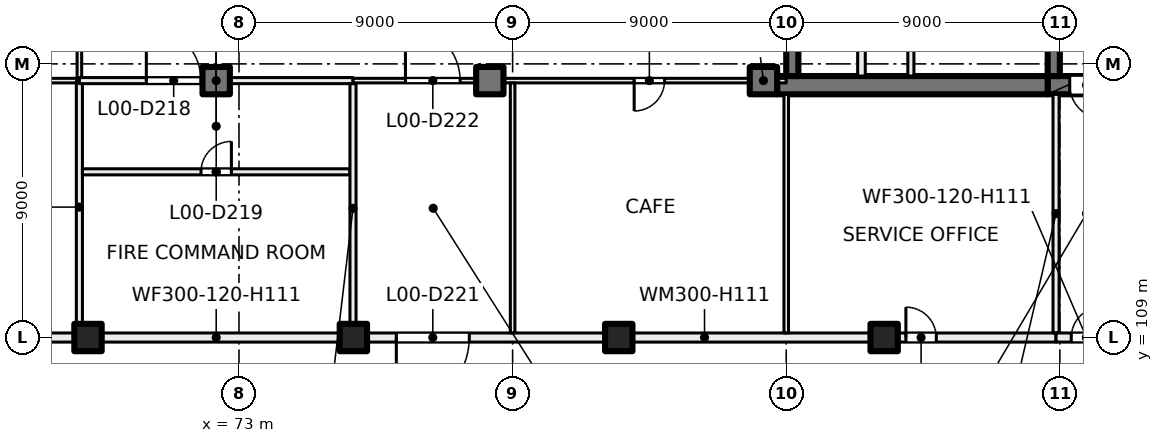
"""IFC4 building model, lengths in metres.
Left out: names, types, materials, properties, quantities, classifications, styles, units other than length and angle.
Written with IfcOpenShell. Run it as: python <this file> out.ifc"""

import sys

from ifc_helpers import new_model, si_unit, direction, frame, frame_2d, origin, origin_2d, place, context, subcontext, project, spatial, rectangle, extrude, element, fill, save


model = new_model("IFC4")
c1 = context("Model", 3, precision=1e-05, world=origin(), true_north=direction((0.0, 1.0)))
c2 = subcontext(c1, "Body", "Model", "MODEL_VIEW")
j1 = project(units=[si_unit("LENGTHUNIT", "METRE"), si_unit("PLANEANGLEUNIT", "RADIAN")], contexts=[c1])
p1 = place(None, origin())
s1 = spatial("IfcSite", under=j1, at=p1, CompositionType="ELEMENT")
p2 = place(p1, origin())
s2 = spatial("IfcBuilding", under=s1, at=p2, CompositionType="ELEMENT")
p3 = place(p2, origin())
s3 = spatial("IfcBuildingStorey", under=s2, at=p3, CompositionType="ELEMENT", Elevation=0.0)
for number, where, z_axis, x_axis in (
    (1, (68.033, 109.0, 0.0), (0.0, 0.0, 1.0), (1.0, 0.0, 0.0)),
    (2, (76.762, 109.0, 0.0), (0.0, 0.0, 1.0), (1.0, 0.0, 0.0)),
    (3, (85.491, 109.0, 0.0), (0.0, 0.0, 1.0), (1.0, 0.0, 0.0)),
    (4, (94.221, 109.0, 0.0), (0.0, 0.0, 1.0), (1.0, 0.0, 0.0)),
    (5, (72.25, 117.45, 0.0), (0.0, 0.0, 1.0), (1.0, 0.0, 0.0)),
    (6, (81.25, 117.45, 0.0), (0.0, 0.0, 1.0), (1.0, 0.0, 0.0)),
    (7, (90.25, 117.45, 0.0), (0.0, 0.0, 1.0), (1.0, 0.0, 0.0)),
):
    element("IfcColumn", number, at=place(p3, frame(where, z_axis=z_axis, x_axis=x_axis)), inside=s3, PredefinedType="COLUMN", context=c2, shape_type="SweptSolid", body=[
        extrude(rectangle(XDim=0.9, YDim=0.9, at=origin_2d()), origin(), (0.0, 0.0, 1.0), 7.5),
    ])
p4 = place(p3, frame((107.4, 117.3, 0.0), z_axis=(0.0, 0.0, 1.0), x_axis=(-1.0, 0.0, 0.0)))
e8 = element("IfcWall", 8, at=p4, inside=s3, PredefinedType="SHEAR", context=c2, shape_type="SweptSolid", body=[
    extrude(rectangle(XDim=7.8, YDim=0.6, at=frame_2d((3.9, 0.0))), origin(), (0.0, 0.0, 1.0), 7.5),
])
p5 = place(p4, frame((5.975, 0.0, 0.0)))
e9 = element("IfcOpeningElement", 9, at=p5, cuts=e8, PredefinedType="OPENING", context=c2, shape_type="SweptSolid", body=[
    extrude(rectangle(XDim=1.1, YDim=2.1, at=frame_2d((0.55, 1.05))), frame((0.0, 0.31, 0.0), z_axis=(0.0, -1.0, 0.0), x_axis=(1.0, 0.0, 0.0)), (0.0, 0.0, 1.0), 0.62),
])
p6 = place(p3, frame((99.6, 117.3, 0.0), z_axis=(0.0, 0.0, 1.0), x_axis=(-1.0, 0.0, 0.0)))
e10 = element("IfcWall", 10, at=p6, inside=s3, PredefinedType="SHEAR", context=c2, shape_type="SweptSolid", body=[
    extrude(rectangle(XDim=8.9, YDim=0.6, at=frame_2d((4.45, 0.0))), origin(), (0.0, 0.0, 1.0), 7.5),
])
p7 = place(p3, frame((99.8, 120.4, 0.0), z_axis=(0.0, 0.0, 1.0), x_axis=(0.0, -1.0, 0.0)))
e11 = element("IfcWall", 11, at=p7, inside=s3, PredefinedType="SHEAR", context=c2, shape_type="SweptSolid", body=[
    extrude(rectangle(XDim=2.8, YDim=0.4, at=frame_2d((1.4, 0.0))), origin(), (0.0, 0.0, 1.0), 7.5),
])
p8 = place(p7, frame((0.9, 0.0, 0.0)))
e12 = element("IfcOpeningElement", 12, at=p8, cuts=e11, PredefinedType="OPENING", context=c2, shape_type="SweptSolid", body=[
    extrude(rectangle(XDim=1.0, YDim=2.1, at=frame_2d((0.5, 1.05))), frame((0.0, 0.21, 0.0), z_axis=(0.0, -1.0, 0.0), x_axis=(1.0, 0.0, 0.0)), (0.0, 0.0, 1.0), 0.42),
])
p9 = place(p3, frame((91.2, 126.2, 0.0), z_axis=(0.0, 0.0, 1.0), x_axis=(0.0, -1.0, 0.0)))
e13 = element("IfcWall", 13, at=p9, inside=s3, PredefinedType="SHEAR", context=c2, shape_type="SweptSolid", body=[
    extrude(rectangle(XDim=8.6, YDim=0.4, at=frame_2d((4.3, 0.0))), origin(), (0.0, 0.0, 1.0), 7.5),
])
p10 = place(p3, frame((95.1, 117.6, 0.0), z_axis=(0.0, 0.0, 1.0), x_axis=(0.0, 1.0, 0.0)))
e14 = element("IfcWall", 14, at=p10, inside=s3, PredefinedType="PARTITIONING", context=c2, shape_type="SweptSolid", body=[
    extrude(rectangle(XDim=8.4, YDim=0.2, at=frame_2d((4.2, 0.0))), origin(), (0.0, 0.0, 1.0), 7.1),
])
p11 = place(p10, frame((1.65, 0.0, 0.0)))
e15 = element("IfcOpeningElement", 15, at=p11, cuts=e14, PredefinedType="OPENING", context=c2, shape_type="SweptSolid", body=[
    extrude(rectangle(XDim=1.5, YDim=2.1, at=frame_2d((0.75, 1.05))), frame((0.0, 0.11, 0.0), z_axis=(0.0, -1.0, 0.0), x_axis=(1.0, 0.0, 0.0)), (0.0, 0.0, 1.0), 0.22),
])
p12 = place(p3, frame((93.475, 117.6, 0.0), z_axis=(0.0, 0.0, 1.0), x_axis=(0.0, 1.0, 0.0)))
e16 = element("IfcWall", 16, at=p12, inside=s3, PredefinedType="PARTITIONING", context=c2, shape_type="SweptSolid", body=[
    extrude(rectangle(XDim=8.4, YDim=0.25, at=frame_2d((4.2, 0.0))), origin(), (0.0, 0.0, 1.0), 7.1),
])
p13 = place(p12, frame((3.8, 0.0, 0.0)))
e17 = element("IfcOpeningElement", 17, at=p13, cuts=e16, PredefinedType="OPENING", context=c2, shape_type="SweptSolid", body=[
    extrude(rectangle(XDim=0.8, YDim=2.1, at=frame_2d((0.4, 1.05))), frame((0.0, 0.135, 0.0), z_axis=(0.0, -1.0, 0.0), x_axis=(1.0, 0.0, 0.0)), (0.0, 0.0, 1.0), 0.27),
])
p14 = place(p3, frame((49.825, 117.45, 0.0), z_axis=(0.0, 0.0, 1.0), x_axis=(1.0, 0.0, 0.0)))
e18 = element("IfcWall", 18, at=p14, inside=s3, PredefinedType="PARTITIONING", context=c2, shape_type="SweptSolid", body=[
    extrude(rectangle(XDim=17.925, YDim=0.15, at=frame_2d((8.962, 0.0))), origin(), (0.0, 0.0, 1.0), 7.1),
])
p15 = place(p3, frame((59.464, 109.0, 0.0), z_axis=(0.0, 0.0, 1.0), x_axis=(1.0, 0.0, 0.0)))
e19 = element("IfcWall", 19, at=p15, inside=s3, PredefinedType="PARTITIONING", context=c2, shape_type="SweptSolid", body=[
    extrude(rectangle(XDim=8.286, YDim=0.3, at=frame_2d((4.143, 0.0))), origin(), (0.0, 0.0, 1.0), 11.1),
])
p16 = place(p3, frame((67.75, 109.15, 0.0), z_axis=(0.0, 0.0, 1.0), x_axis=(0.0, 1.0, 0.0)))
e20 = element("IfcWall", 20, at=p16, inside=s3, PredefinedType="PARTITIONING", context=c2, shape_type="SweptSolid", body=[
    extrude(rectangle(XDim=8.28, YDim=0.2, at=frame_2d((4.14, 0.0))), origin(), (0.0, 0.0, 1.0), 7.1),
])
p17 = place(p3, frame((67.75, 109.0, 0.0), z_axis=(0.0, 0.0, 1.0), x_axis=(1.0, 0.0, 0.0)))
e21 = element("IfcWall", 21, at=p17, inside=s3, PredefinedType="PARTITIONING", context=c2, shape_type="SweptSolid", body=[
    extrude(rectangle(XDim=9.0, YDim=0.3, at=frame_2d((4.5, 0.0))), origin(), (0.0, 0.0, 1.0), 11.1),
])
p18 = place(p3, frame((76.65, 114.45, 0.0), z_axis=(0.0, 0.0, 1.0), x_axis=(-1.0, 0.0, 0.0)))
e22 = element("IfcWall", 22, at=p18, inside=s3, PredefinedType="PARTITIONING", context=c2, shape_type="SweptSolid", body=[
    extrude(rectangle(XDim=8.8, YDim=0.2, at=frame_2d((4.4, 0.0))), origin(), (0.0, 0.0, 1.0), 7.1),
])
p19 = place(p18, frame((3.9, 0.0, 0.0)))
e23 = element("IfcOpeningElement", 23, at=p19, cuts=e22, PredefinedType="OPENING", context=c2, shape_type="SweptSolid", body=[
    extrude(rectangle(XDim=1.0, YDim=2.1, at=frame_2d((0.5, 1.05))), frame((0.0, 0.11, 0.0), z_axis=(0.0, -1.0, 0.0), x_axis=(1.0, 0.0, 0.0)), (0.0, 0.0, 1.0), 0.22),
])
p20 = place(p3, frame((67.75, 117.45, 0.0), z_axis=(0.0, 0.0, 1.0), x_axis=(0.0, 1.0, 0.0)))
e24 = element("IfcWall", 24, at=p20, inside=s3, PredefinedType="PARTITIONING", context=c2, shape_type="SweptSolid", body=[
    extrude(rectangle(XDim=8.55, YDim=0.15, at=frame_2d((4.275, 0.0))), origin(), (0.0, 0.0, 1.0), 7.1),
])
p21 = place(p3, frame((67.75, 117.45, 0.0), z_axis=(0.0, 0.0, 1.0), x_axis=(1.0, 0.0, 0.0)))
e25 = element("IfcWall", 25, at=p21, inside=s3, PredefinedType="PARTITIONING", context=c2, shape_type="SweptSolid", body=[
    extrude(rectangle(XDim=9.0, YDim=0.2, at=frame_2d((4.5, 0.0))), origin(), (0.0, 0.0, 1.0), 7.1),
])
p22 = place(p21, frame((2.202, 0.0, 0.0)))
e26 = element("IfcOpeningElement", 26, at=p22, cuts=e25, PredefinedType="OPENING", context=c2, shape_type="SweptSolid", body=[
    extrude(rectangle(XDim=1.8, YDim=2.1, at=frame_2d((0.9, 1.05))), frame((0.0, 0.11, 0.0), z_axis=(0.0, -1.0, 0.0), x_axis=(1.0, 0.0, 0.0)), (0.0, 0.0, 1.0), 0.22),
])
p23 = place(p3, frame((76.75, 109.15, 0.0), z_axis=(0.0, 0.0, 1.0), x_axis=(0.0, 1.0, 0.0)))
e27 = element("IfcWall", 27, at=p23, inside=s3, PredefinedType="PARTITIONING", context=c2, shape_type="SweptSolid", body=[
    extrude(rectangle(XDim=8.2, YDim=0.2, at=frame_2d((4.1, 0.0))), origin(), (0.0, 0.0, 1.0), 7.1),
])
p24 = place(p3, frame((76.75, 109.0, 0.0), z_axis=(0.0, 0.0, 1.0), x_axis=(1.0, 0.0, 0.0)))
e28 = element("IfcWall", 28, at=p24, inside=s3, PredefinedType="PARTITIONING", context=c2, shape_type="SweptSolid", body=[
    extrude(rectangle(XDim=23.125, YDim=0.3, at=frame_2d((11.562, 0.0))), origin(), (0.0, 0.0, 1.0), 11.1),
])
p25 = place(p24, frame((1.425, 0.0, 0.0)))
e29 = element("IfcOpeningElement", 29, at=p25, cuts=e28, PredefinedType="OPENING", context=c2, shape_type="SweptSolid", body=[
    extrude(rectangle(XDim=2.4, YDim=2.4, at=frame_2d((1.2, 1.2))), frame((0.0, 0.16, 0.0), z_axis=(0.0, -1.0, 0.0), x_axis=(1.0, 0.0, 0.0)), (0.0, 0.0, 1.0), 0.32),
])
p26 = place(p24, frame((18.186, 0.0, 0.0)))
e30 = element("IfcOpeningElement", 30, at=p26, cuts=e28, PredefinedType="OPENING", context=c2, shape_type="SweptSolid", body=[
    extrude(rectangle(XDim=1.0, YDim=2.1, at=frame_2d((0.5, 1.05))), frame((0.0, 0.16, 0.0), z_axis=(0.0, -1.0, 0.0), x_axis=(1.0, 0.0, 0.0)), (0.0, 0.0, 1.0), 0.32),
])
p27 = place(p3, frame((76.75, 117.45, 0.0), z_axis=(0.0, 0.0, 1.0), x_axis=(1.0, 0.0, 0.0)))
e31 = element("IfcWall", 31, at=p27, inside=s3, PredefinedType="PARTITIONING", context=c2, shape_type="SweptSolid", body=[
    extrude(rectangle(XDim=14.25, YDim=0.15, at=frame_2d((7.125, 0.0))), origin(), (0.0, 0.0, 1.0), 7.1),
])
p28 = place(p27, frame((1.725, 0.0, 0.0)))
e32 = element("IfcOpeningElement", 32, at=p28, cuts=e31, PredefinedType="OPENING", context=c2, shape_type="SweptSolid", body=[
    extrude(rectangle(XDim=1.8, YDim=2.1, at=frame_2d((0.9, 1.05))), frame((0.0, 0.085, 0.0), z_axis=(0.0, -1.0, 0.0), x_axis=(1.0, 0.0, 0.0)), (0.0, 0.0, 1.0), 0.17),
])
p29 = place(p27, frame((9.248, 0.0, 0.0)))
e33 = element("IfcOpeningElement", 33, at=p29, cuts=e31, PredefinedType="OPENING", context=c2, shape_type="SweptSolid", body=[
    extrude(rectangle(XDim=1.0, YDim=2.1, at=frame_2d((0.5, 1.05))), frame((0.0, 0.085, 0.0), z_axis=(0.0, -1.0, 0.0), x_axis=(1.0, 0.0, 0.0)), (0.0, 0.0, 1.0), 0.17),
])
p30 = place(p3, frame((82.0, 109.15, 0.0), z_axis=(0.0, 0.0, 1.0), x_axis=(0.0, 1.0, 0.0)))
e34 = element("IfcWall", 34, at=p30, inside=s3, PredefinedType="PARTITIONING", context=c2, shape_type="SweptSolid", body=[
    extrude(rectangle(XDim=8.225, YDim=0.15, at=frame_2d((4.113, 0.0))), origin(), (0.0, 0.0, 1.0), 7.1),
])
p31 = place(p3, frame((91.0, 109.15, 0.0), z_axis=(0.0, 0.0, 1.0), x_axis=(0.0, 1.0, 0.0)))
e35 = element("IfcWall", 35, at=p31, inside=s3, PredefinedType="PARTITIONING", context=c2, shape_type="SweptSolid", body=[
    extrude(rectangle(XDim=7.85, YDim=0.15, at=frame_2d((3.925, 0.0))), origin(), (0.0, 0.0, 1.0), 7.1),
])
p32 = place(p3, frame((99.875, 109.15, 0.0), z_axis=(0.0, 0.0, 1.0), x_axis=(0.0, 1.0, 0.0)))
e36 = element("IfcWall", 36, at=p32, inside=s3, PredefinedType="PARTITIONING", context=c2, shape_type="SweptSolid", body=[
    extrude(rectangle(XDim=7.85, YDim=0.2, at=frame_2d((3.925, 0.0))), origin(), (0.0, 0.0, 1.0), 7.1),
])
p33 = place(p3, frame((101.875, 109.0, 0.0), z_axis=(0.0, 0.0, 1.0), x_axis=(-1.0, 0.0, 0.0)))
e37 = element("IfcWall", 37, at=p33, inside=s3, PredefinedType="PARTITIONING", context=c2, shape_type="SweptSolid", body=[
    extrude(rectangle(XDim=2.0, YDim=0.3, at=frame_2d((1.0, 0.0))), origin(), (0.0, 0.0, 1.0), 11.1),
])
p34 = place(p33, frame((0.5, 0.0, 0.0)))
e38 = element("IfcOpeningElement", 38, at=p34, cuts=e37, PredefinedType="OPENING", context=c2, shape_type="SweptSolid", body=[
    extrude(rectangle(XDim=1.0, YDim=2.1, at=frame_2d((0.5, 1.05))), frame((0.0, 0.16, 0.0), z_axis=(0.0, -1.0, 0.0), x_axis=(1.0, 0.0, 0.0)), (0.0, 0.0, 1.0), 0.32),
])
p35 = place(p5, origin())
e39 = element("IfcDoor", 39, at=p35, inside=s3, OperationType="SINGLE_SWING_LEFT", PredefinedType="DOOR", context=c2, shape_type="SweptSolid", body=[
    extrude(rectangle(XDim=1.1, YDim=2.1, at=frame_2d((0.55, 1.05))), frame((0.0, 0.025, 0.0), z_axis=(0.0, -1.0, 0.0), x_axis=(1.0, 0.0, 0.0)), (0.0, 0.0, 1.0), 0.05),
])
fill(e9, e39)
p36 = place(p22, origin())
e40 = element("IfcDoor", 40, at=p36, inside=s3, OperationType="DOUBLE_DOOR_SINGLE_SWING", PredefinedType="DOOR", context=c2, shape_type="SweptSolid", body=[
    extrude(rectangle(XDim=1.8, YDim=2.1, at=frame_2d((0.9, 1.05))), frame((0.0, 0.025, 0.0), z_axis=(0.0, -1.0, 0.0), x_axis=(1.0, 0.0, 0.0)), (0.0, 0.0, 1.0), 0.05),
])
fill(e26, e40)
p37 = place(p19, origin())
e41 = element("IfcDoor", 41, at=p37, inside=s3, OperationType="SINGLE_SWING_LEFT", PredefinedType="DOOR", context=c2, shape_type="SweptSolid", body=[
    extrude(rectangle(XDim=1.0, YDim=2.1, at=frame_2d((0.5, 1.05))), frame((0.0, 0.025, 0.0), z_axis=(0.0, -1.0, 0.0), x_axis=(1.0, 0.0, 0.0)), (0.0, 0.0, 1.0), 0.05),
])
fill(e23, e41)
p38 = place(p25, origin())
e42 = element("IfcDoor", 42, at=p38, inside=s3, OperationType="DOUBLE_DOOR_SINGLE_SWING", PredefinedType="DOOR", context=c2, shape_type="SweptSolid", body=[
    extrude(rectangle(XDim=2.4, YDim=2.4, at=frame_2d((1.2, 1.2))), frame((0.0, 0.025, 0.0), z_axis=(0.0, -1.0, 0.0), x_axis=(1.0, 0.0, 0.0)), (0.0, 0.0, 1.0), 0.05),
])
fill(e29, e42)
p39 = place(p28, origin())
e43 = element("IfcDoor", 43, at=p39, inside=s3, OperationType="DOUBLE_DOOR_SINGLE_SWING", PredefinedType="DOOR", context=c2, shape_type="SweptSolid", body=[
    extrude(rectangle(XDim=1.8, YDim=2.1, at=frame_2d((0.9, 1.05))), frame((0.0, 0.025, 0.0), z_axis=(0.0, -1.0, 0.0), x_axis=(1.0, 0.0, 0.0)), (0.0, 0.0, 1.0), 0.05),
])
fill(e32, e43)
p40 = place(p29, origin())
e44 = element("IfcDoor", 44, at=p40, inside=s3, OperationType="SINGLE_SWING_LEFT", PredefinedType="DOOR", context=c2, shape_type="SweptSolid", body=[
    extrude(rectangle(XDim=1.0, YDim=2.1, at=frame_2d((0.5, 1.05))), frame((0.0, 0.025, 0.0), z_axis=(0.0, -1.0, 0.0), x_axis=(1.0, 0.0, 0.0)), (0.0, 0.0, 1.0), 0.05),
])
fill(e33, e44)
p41 = place(p26, origin())
e45 = element("IfcDoor", 45, at=p41, inside=s3, OperationType="SINGLE_SWING_LEFT", PredefinedType="DOOR", context=c2, shape_type="SweptSolid", body=[
    extrude(rectangle(XDim=1.0, YDim=2.1, at=frame_2d((0.5, 1.05))), frame((0.0, 0.025, 0.0), z_axis=(0.0, -1.0, 0.0), x_axis=(1.0, 0.0, 0.0)), (0.0, 0.0, 1.0), 0.05),
])
fill(e30, e45)
p42 = place(p34, origin())
e46 = element("IfcDoor", 46, at=p42, inside=s3, OperationType="SINGLE_SWING_LEFT", PredefinedType="DOOR", context=c2, shape_type="SweptSolid", body=[
    extrude(rectangle(XDim=1.0, YDim=2.1, at=frame_2d((0.5, 1.05))), frame((0.0, 0.025, 0.0), z_axis=(0.0, -1.0, 0.0), x_axis=(1.0, 0.0, 0.0)), (0.0, 0.0, 1.0), 0.05),
])
fill(e38, e46)
save(model, sys.argv[1])
